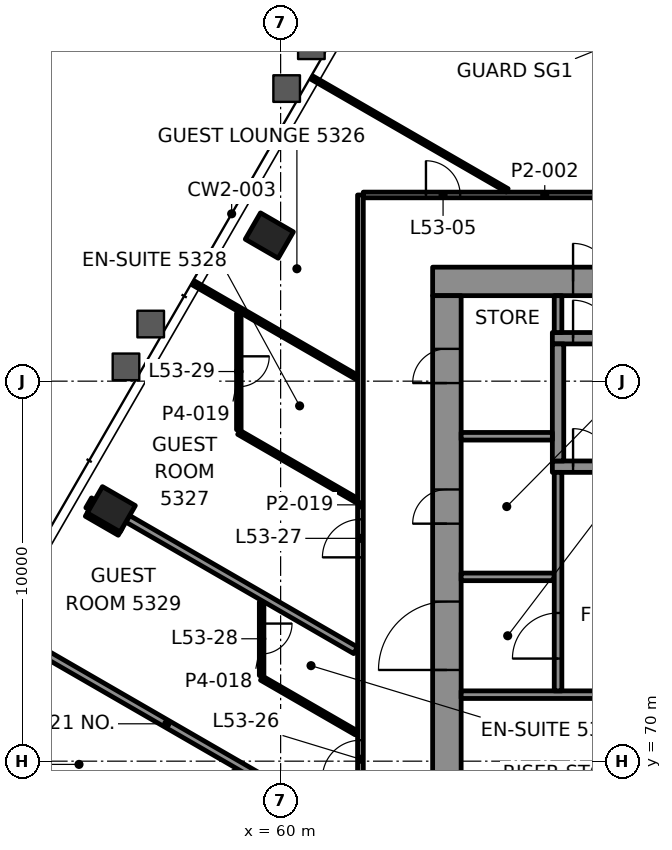
"""IFC4 building model, lengths in metres.
Left out: names, types, materials, properties, quantities, classifications, styles, units other than length and angle.
Written with IfcOpenShell. Run it as: python <this file> out.ifc"""

import sys

from ifc_helpers import new_model, si_unit, direction, frame, frame_2d, origin, origin_2d, place, context, subcontext, project, spatial, rectangle, hollow_rectangle, extrude, element, fill, save


model = new_model("IFC4")
c1 = context("Model", 3, precision=1e-05, world=origin(), true_north=direction((0.0, 1.0)))
c2 = subcontext(c1, "Body", "Model", "MODEL_VIEW")
j1 = project(units=[si_unit("LENGTHUNIT", "METRE"), si_unit("PLANEANGLEUNIT", "RADIAN")], contexts=[c1])
p1 = place(None, origin())
s1 = spatial("IfcSite", under=j1, at=p1, CompositionType="ELEMENT")
p2 = place(p1, origin())
s2 = spatial("IfcBuilding", under=s1, at=p2, CompositionType="ELEMENT")
p3 = place(p2, frame((0.0, 0.0, 226.0)))
s3 = spatial("IfcBuildingStorey", under=s2, at=p3, CompositionType="ELEMENT", Elevation=226.0)
for number, where, z_axis, x_axis in (
    (1, (59.703, 83.832, -0.0), (0.0, 0.0, 1.0), (-0.5, -0.866, 0.0)),
    (2, (55.544, 76.628, -0.0), (0.0, 0.0, 1.0), (-0.5, -0.866, 0.0)),
):
    element("IfcColumn", number, at=place(p3, frame(where, z_axis=z_axis, x_axis=x_axis)), inside=s3, PredefinedType="COLUMN", context=c2, shape_type="SweptSolid", body=[
        extrude(hollow_rectangle(XDim=0.8, YDim=1.0, WallThickness=0.05, at=origin_2d()), origin(), (0.0, 0.0, 1.0), 3.9),
    ])
p4 = place(p3, frame((64.0, 82.625, 0.0), z_axis=(0.0, 0.0, 1.0), x_axis=(1.0, 0.0, 0.0)))
e3 = element("IfcWall", 3, at=p4, inside=s3, PredefinedType="SHEAR", context=c2, shape_type="SweptSolid", body=[
    extrude(rectangle(XDim=22.0, YDim=0.75, at=frame_2d((11.0, 0.0))), origin(), (0.0, 0.0, 1.0), 3.7),
])
p5 = place(p4, frame((3.695, 0.0, 0.0)))
e4 = element("IfcOpeningElement", 4, at=p5, cuts=e3, PredefinedType="OPENING", context=c2, shape_type="SweptSolid", body=[
    extrude(rectangle(XDim=1.0, YDim=2.1, at=frame_2d((0.5, 1.05))), frame((0.0, 0.385, 0.0), z_axis=(0.0, -1.0, 0.0), x_axis=(1.0, 0.0, 0.0)), (0.0, 0.0, 1.0), 0.77),
])
p6 = place(p4, frame((17.505, 0.0, 0.0)))
e5 = element("IfcOpeningElement", 5, at=p6, cuts=e3, PredefinedType="OPENING", context=c2, shape_type="SweptSolid", body=[
    extrude(rectangle(XDim=1.0, YDim=2.1, at=frame_2d((0.5, 1.05))), frame((0.0, 0.385, 0.0), z_axis=(0.0, -1.0, 0.0), x_axis=(1.0, 0.0, 0.0)), (0.0, 0.0, 1.0), 0.77),
])
p7 = place(p4, frame((10.65, 0.0, 0.0)))
e6 = element("IfcOpeningElement", 6, at=p7, cuts=e3, PredefinedType="OPENING", context=c2, shape_type="SweptSolid", body=[
    extrude(rectangle(XDim=0.9, YDim=2.1, at=frame_2d((0.45, 1.05))), frame((0.0, 0.385, 0.0), z_axis=(0.0, -1.0, 0.0), x_axis=(1.0, 0.0, 0.0)), (0.0, 0.0, 1.0), 0.77),
])
p8 = place(p3, frame((64.375, 67.75, 0.0), z_axis=(0.0, 0.0, 1.0), x_axis=(0.0, 1.0, 0.0)))
e7 = element("IfcWall", 7, at=p8, inside=s3, PredefinedType="SHEAR", context=c2, shape_type="SweptSolid", body=[
    extrude(rectangle(XDim=14.5, YDim=0.75, at=frame_2d((7.25, 0.0))), origin(), (0.0, 0.0, 1.0), 3.7),
])
p9 = place(p8, frame((4.65, 0.0, 0.0)))
e8 = element("IfcOpeningElement", 8, at=p9, cuts=e7, PredefinedType="OPENING", context=c2, shape_type="SweptSolid", body=[
    extrude(rectangle(XDim=1.8, YDim=2.1, at=frame_2d((0.9, 1.05))), frame((0.0, 0.385, 0.0), z_axis=(0.0, -1.0, 0.0), x_axis=(1.0, 0.0, 0.0)), (0.0, 0.0, 1.0), 0.77),
])
p10 = place(p8, frame((8.5, 0.0, 0.0)))
e9 = element("IfcOpeningElement", 9, at=p10, cuts=e7, PredefinedType="OPENING", context=c2, shape_type="SweptSolid", body=[
    extrude(rectangle(XDim=0.9, YDim=2.1, at=frame_2d((0.45, 1.05))), frame((0.0, 0.385, 0.0), z_axis=(0.0, -1.0, 0.0), x_axis=(1.0, 0.0, 0.0)), (0.0, 0.0, 1.0), 0.77),
])
p11 = place(p8, frame((12.2, 0.0, 0.0)))
e10 = element("IfcOpeningElement", 10, at=p11, cuts=e7, PredefinedType="OPENING", context=c2, shape_type="SweptSolid", body=[
    extrude(rectangle(XDim=0.9, YDim=2.1, at=frame_2d((0.45, 1.05))), frame((0.0, 0.385, 0.0), z_axis=(0.0, -1.0, 0.0), x_axis=(1.0, 0.0, 0.0)), (0.0, 0.0, 1.0), 0.77),
])
p12 = place(p3, frame((67.15, 77.75, 0.0), z_axis=(0.0, 0.0, 1.0), x_axis=(1.0, 0.0, 0.0)))
e11 = element("IfcWall", 11, at=p12, inside=s3, PredefinedType="SHEAR", context=c2, shape_type="SweptSolid", body=[
    extrude(rectangle(XDim=17.45, YDim=0.3, at=frame_2d((8.725, 0.0))), origin(), (0.0, 0.0, 1.0), 3.7),
])
p13 = place(p12, frame((0.545, 0.0, 0.0)))
e12 = element("IfcOpeningElement", 12, at=p13, cuts=e11, PredefinedType="OPENING", context=c2, shape_type="SweptSolid", body=[
    extrude(rectangle(XDim=1.0, YDim=2.1, at=frame_2d((0.5, 1.05))), frame((0.0, 0.16, 0.0), z_axis=(0.0, -1.0, 0.0), x_axis=(1.0, 0.0, 0.0)), (0.0, 0.0, 1.0), 0.32),
])
p14 = place(p3, frame((67.15, 81.13, 0.0), z_axis=(0.0, 0.0, 1.0), x_axis=(1.0, 0.0, 0.0)))
e13 = element("IfcWall", 13, at=p14, inside=s3, PredefinedType="SHEAR", context=c2, shape_type="SweptSolid", body=[
    extrude(rectangle(XDim=6.91, YDim=0.3, at=frame_2d((3.455, 0.0))), origin(), (0.0, 0.0, 1.0), 3.7),
])
p15 = place(p14, frame((0.545, 0.0, 0.0)))
e14 = element("IfcOpeningElement", 14, at=p15, cuts=e13, PredefinedType="OPENING", context=c2, shape_type="SweptSolid", body=[
    extrude(rectangle(XDim=1.0, YDim=2.1, at=frame_2d((0.5, 1.05))), frame((0.0, 0.16, 0.0), z_axis=(0.0, -1.0, 0.0), x_axis=(1.0, 0.0, 0.0)), (0.0, 0.0, 1.0), 0.32),
])
p16 = place(p3, frame((67.3, 77.9, 0.0), z_axis=(0.0, 0.0, 1.0), x_axis=(0.0, 1.0, 0.0)))
e15 = element("IfcWall", 15, at=p16, inside=s3, PredefinedType="SHEAR", context=c2, shape_type="SweptSolid", body=[
    extrude(rectangle(XDim=3.08, YDim=0.3, at=frame_2d((1.54, 0.0))), origin(), (0.0, 0.0, 1.0), 3.7),
])
p17 = place(p3, frame((62.176, 84.9, 0.0), z_axis=(0.0, 0.0, 1.0), x_axis=(1.0, 0.0, 0.0)))
e16 = element("IfcWall", 16, at=p17, inside=s3, PredefinedType="PARTITIONING", context=c2, shape_type="SweptSolid", body=[
    extrude(rectangle(XDim=9.55, YDim=0.15, at=frame_2d((4.775, 0.0))), origin(), (0.0, 0.0, 1.0), 3.097),
])
p18 = place(p17, frame((1.649, 0.0, 0.0)))
e17 = element("IfcOpeningElement", 17, at=p18, cuts=e16, PredefinedType="OPENING", context=c2, shape_type="SweptSolid", body=[
    extrude(rectangle(XDim=0.9, YDim=2.1, at=frame_2d((0.45, 1.05))), frame((0.0, 0.085, 0.0), z_axis=(0.0, -1.0, 0.0), x_axis=(1.0, 0.0, 0.0)), (0.0, 0.0, 1.0), 0.17),
])
p19 = place(p17, frame((7.759, 0.0, 0.0)))
e18 = element("IfcOpeningElement", 18, at=p19, cuts=e16, PredefinedType="OPENING", context=c2, shape_type="SweptSolid", body=[
    extrude(rectangle(XDim=1.0, YDim=2.1, at=frame_2d((0.5, 1.05))), frame((0.0, 0.085, 0.0), z_axis=(0.0, -1.0, 0.0), x_axis=(1.0, 0.0, 0.0)), (0.0, 0.0, 1.0), 0.17),
])
p20 = place(p3, frame((58.889, 69.74, 0.0), z_axis=(0.0, 0.0, 1.0), x_axis=(-0.866039783157, -0.499975093369, 0.0)))
e19 = element("IfcWall", 19, at=p20, inside=s3, PredefinedType="PARTITIONING", context=c2, shape_type="SweptSolid", body=[
    extrude(rectangle(XDim=1.896, YDim=0.12, at=frame_2d((0.948, 0.0))), origin(), (0.0, 0.0, 1.0), 3.1),
])
p21 = place(p20, frame((0.548, 0.0, 0.0)))
e20 = element("IfcOpeningElement", 20, at=p21, cuts=e19, PredefinedType="OPENING", context=c2, shape_type="SweptSolid", body=[
    extrude(rectangle(XDim=0.8, YDim=2.1, at=frame_2d((0.4, 1.05))), frame((0.0, 0.07, 0.0), z_axis=(0.0, -1.0, 0.0), x_axis=(1.0, 0.0, 0.0)), (0.0, 0.0, 1.0), 0.14),
])
p22 = place(p3, frame((54.961, 76.619, 0.0), z_axis=(0.0, 0.0, 1.0), x_axis=(0.500426713919, 0.865778900179, 0.0)))
e21 = element("IfcWall", 21, at=p22, inside=s3, PredefinedType="PARTITIONING", context=c2, shape_type="SweptSolid", body=[
    extrude(rectangle(XDim=0.3, YDim=0.2, at=frame_2d((0.15, 0.0))), origin(), (0.0, 0.0, 1.0), 3.1),
])
p23 = place(p3, frame((62.1, 68.591, 0.0), z_axis=(0.0, 0.0, 1.0), x_axis=(0.0, 1.0, 0.0)))
e22 = element("IfcWall", 22, at=p23, inside=s3, PredefinedType="PARTITIONING", context=c2, shape_type="SweptSolid", body=[
    extrude(rectangle(XDim=16.308, YDim=0.15, at=frame_2d((8.154, 0.0))), origin(), (0.0, 0.0, 1.0), 3.1),
])
p24 = place(p23, frame((0.96, 0.0, 0.0)))
e23 = element("IfcOpeningElement", 23, at=p24, cuts=e22, PredefinedType="OPENING", context=c2, shape_type="SweptSolid", body=[
    extrude(rectangle(XDim=1.0, YDim=2.1, at=frame_2d((0.5, 1.05))), frame((0.0, 0.085, 0.0), z_axis=(0.0, -1.0, 0.0), x_axis=(1.0, 0.0, 0.0)), (0.0, 0.0, 1.0), 0.17),
])
p25 = place(p23, frame((6.772, 0.0, 0.0)))
e24 = element("IfcOpeningElement", 24, at=p25, cuts=e22, PredefinedType="OPENING", context=c2, shape_type="SweptSolid", body=[
    extrude(rectangle(XDim=1.0, YDim=2.1, at=frame_2d((0.5, 1.05))), frame((0.0, 0.085, 0.0), z_axis=(0.0, -1.0, 0.0), x_axis=(1.0, 0.0, 0.0)), (0.0, 0.0, 1.0), 0.17),
])
p26 = place(p3, frame((59.5, 74.189, 0.0), z_axis=(0.0, 0.0, 1.0), x_axis=(0.0, -1.0, 0.0)))
e25 = element("IfcWall", 25, at=p26, inside=s3, PredefinedType="PARTITIONING", context=c2, shape_type="SweptSolid", body=[
    extrude(rectangle(XDim=1.936, YDim=0.12, at=frame_2d((0.968, 0.0))), origin(), (0.0, 0.0, 1.0), 3.1),
])
p27 = place(p26, frame((0.568, 0.0, 0.0)))
e26 = element("IfcOpeningElement", 26, at=p27, cuts=e25, PredefinedType="OPENING", context=c2, shape_type="SweptSolid", body=[
    extrude(rectangle(XDim=0.8, YDim=2.1, at=frame_2d((0.4, 1.05))), frame((0.0, 0.07, 0.0), z_axis=(0.0, -1.0, 0.0), x_axis=(1.0, 0.0, 0.0)), (0.0, 0.0, 1.0), 0.14),
])
p28 = place(p3, frame((58.9, 81.785, 0.0), z_axis=(0.0, 0.0, 1.0), x_axis=(0.0, -1.0, 0.0)))
e27 = element("IfcWall", 27, at=p28, inside=s3, PredefinedType="PARTITIONING", context=c2, shape_type="SweptSolid", body=[
    extrude(rectangle(XDim=3.063, YDim=0.12, at=frame_2d((1.531, 0.0))), origin(), (0.0, 0.0, 1.0), 3.1),
])
p29 = place(p28, frame((1.131, 0.0, 0.0)))
e28 = element("IfcOpeningElement", 28, at=p29, cuts=e27, PredefinedType="OPENING", context=c2, shape_type="SweptSolid", body=[
    extrude(rectangle(XDim=0.8, YDim=2.1, at=frame_2d((0.4, 1.05))), frame((0.0, 0.07, 0.0), z_axis=(0.0, -1.0, 0.0), x_axis=(1.0, 0.0, 0.0)), (0.0, 0.0, 1.0), 0.14),
])
p30 = place(p3, frame((69.79, 88.092, 0.0), z_axis=(0.0, 0.0, 1.0), x_axis=(-0.866045006744, 0.49996604514, 0.0)))
e29 = element("IfcWall", 29, at=p30, inside=s3, PredefinedType="PARTITIONING", context=c2, shape_type="SweptSolid", body=[
    extrude(rectangle(XDim=3.499, YDim=0.12, at=frame_2d((1.75, 0.0))), origin(), (0.0, 0.0, 1.0), 3.1),
])
p31 = place(p3, frame((65.963, 85.02, 0.0), z_axis=(0.0, 0.0, 1.0), x_axis=(-0.866029186229, 0.499993448556, 0.0)))
e30 = element("IfcWall", 30, at=p31, inside=s3, PredefinedType="PARTITIONING", context=c2, shape_type="SweptSolid", body=[
    extrude(rectangle(XDim=5.927, YDim=0.1, at=frame_2d((2.963, 0.0))), origin(), (0.0, 0.0, 1.0), 3.022),
])
p32 = place(p3, frame((61.991, 80.11, 0.0), z_axis=(0.0, 0.0, 1.0), x_axis=(-0.866024338871, 0.500001844479, 0.0)))
e31 = element("IfcWall", 31, at=p32, inside=s3, PredefinedType="PARTITIONING", context=c2, shape_type="SweptSolid", body=[
    extrude(rectangle(XDim=4.942, YDim=0.12, at=frame_2d((2.471, 0.0))), origin(), (0.0, 0.0, 1.0), 3.022),
])
p33 = place(p3, frame((61.99, 76.868, 0.0), z_axis=(0.0, 0.0, 1.0), x_axis=(-0.866028357664, 0.499994883695, 0.0)))
e32 = element("IfcWall", 32, at=p33, inside=s3, PredefinedType="PARTITIONING", context=c2, shape_type="SweptSolid", body=[
    extrude(rectangle(XDim=3.568, YDim=0.12, at=frame_2d((1.784, 0.0))), origin(), (0.0, 0.0, 1.0), 3.1),
])
p34 = place(p3, frame((61.973, 72.917, 0.0), z_axis=(0.0, 0.0, 1.0), x_axis=(-0.866027621823, 0.499996158224, 0.0)))
e33 = element("IfcWall", 33, at=p34, inside=s3, PredefinedType="PARTITIONING", context=c2, shape_type="SweptSolid", body=[
    extrude(rectangle(XDim=6.923, YDim=0.2, at=frame_2d((3.462, 0.0))), origin(), (0.0, 0.0, 1.0), 3.1),
])
p35 = place(p3, frame((55.777, 76.032, 0.0), z_axis=(0.0, 0.0, 1.0), x_axis=(-0.866010750942, 0.50002537861, 0.0)))
e34 = element("IfcWall", 34, at=p35, inside=s3, PredefinedType="PARTITIONING", context=c2, shape_type="SweptSolid", body=[
    extrude(rectangle(XDim=1.0, YDim=0.2, at=frame_2d((0.5, 0.0))), origin(), (0.0, 0.0, 1.0), 3.022),
])
p36 = place(p3, frame((61.99, 70.746, 0.0), z_axis=(0.0, 0.0, 1.0), x_axis=(-0.86600886466, 0.50002864551, 0.0)))
e35 = element("IfcWall", 35, at=p36, inside=s3, PredefinedType="PARTITIONING", context=c2, shape_type="SweptSolid", body=[
    extrude(rectangle(XDim=2.876, YDim=0.12, at=frame_2d((1.438, 0.0))), origin(), (0.0, 0.0, 1.0), 3.1),
])
p37 = place(p3, frame((61.497, 68.39, 0.0), z_axis=(0.0, 0.0, 1.0), x_axis=(-0.866030396021, 0.499991353094, 0.0)))
e36 = element("IfcWall", 36, at=p37, inside=s3, PredefinedType="PARTITIONING", context=c2, shape_type="SweptSolid", body=[
    extrude(rectangle(XDim=10.374, YDim=0.2, at=frame_2d((5.187, 0.0))), origin(), (0.0, 0.0, 1.0), 3.022),
])
p38 = place(p3, frame((64.75, 71.75, 0.0), z_axis=(0.0, 0.0, 1.0), x_axis=(1.0, 0.0, 0.0)))
e37 = element("IfcWall", 37, at=p38, inside=s3, PredefinedType="PARTITIONING", context=c2, shape_type="SweptSolid", body=[
    extrude(rectangle(XDim=5.55, YDim=0.2, at=frame_2d((2.775, 0.0))), origin(), (0.0, 0.0, 1.0), 3.7),
])
p39 = place(p3, frame((64.75, 74.85, 0.0), z_axis=(0.0, 0.0, 1.0), x_axis=(1.0, 0.0, 0.0)))
e38 = element("IfcWall", 38, at=p39, inside=s3, PredefinedType="PARTITIONING", context=c2, shape_type="SweptSolid", body=[
    extrude(rectangle(XDim=2.45, YDim=0.2, at=frame_2d((1.225, 0.0))), origin(), (0.0, 0.0, 1.0), 3.7),
])
p40 = place(p3, frame((64.75, 78.55, 0.0), z_axis=(0.0, 0.0, 1.0), x_axis=(1.0, 0.0, 0.0)))
e39 = element("IfcWall", 39, at=p40, inside=s3, PredefinedType="PARTITIONING", context=c2, shape_type="SweptSolid", body=[
    extrude(rectangle(XDim=2.4, YDim=0.2, at=frame_2d((1.2, 0.0))), origin(), (0.0, 0.0, 1.0), 3.7),
])
p41 = place(p3, frame((67.3, 71.85, 0.0), z_axis=(0.0, 0.0, 1.0), x_axis=(0.0, 1.0, 0.0)))
e40 = element("IfcWall", 40, at=p41, inside=s3, PredefinedType="PARTITIONING", context=c2, shape_type="SweptSolid", body=[
    extrude(rectangle(XDim=5.75, YDim=0.2, at=frame_2d((2.875, 0.0))), origin(), (0.0, 0.0, 1.0), 3.7),
])
p42 = place(p41, frame((0.85, 0.0, 0.0)))
e41 = element("IfcOpeningElement", 41, at=p42, cuts=e40, PredefinedType="OPENING", context=c2, shape_type="SweptSolid", body=[
    extrude(rectangle(XDim=1.2, YDim=2.1, at=frame_2d((0.6, 1.05))), frame((0.0, 0.11, 0.0), z_axis=(0.0, -1.0, 0.0), x_axis=(1.0, 0.0, 0.0)), (0.0, 0.0, 1.0), 0.22),
])
p43 = place(p3, frame((67.3, 81.28, 0.0), z_axis=(0.0, 0.0, 1.0), x_axis=(0.0, 1.0, 0.0)))
e42 = element("IfcWall", 42, at=p43, inside=s3, PredefinedType="PARTITIONING", context=c2, shape_type="SweptSolid", body=[
    extrude(rectangle(XDim=0.97, YDim=0.2, at=frame_2d((0.485, 0.0))), origin(), (0.0, 0.0, 1.0), 3.7),
])
p44 = place(p18, origin())
e43 = element("IfcDoor", 43, at=p44, inside=s3, OperationType="SINGLE_SWING_LEFT", PredefinedType="DOOR", context=c2, shape_type="SweptSolid", body=[
    extrude(rectangle(XDim=0.9, YDim=2.1, at=frame_2d((0.45, 1.05))), frame((0.0, 0.025, 0.0), z_axis=(0.0, -1.0, 0.0), x_axis=(1.0, 0.0, 0.0)), (0.0, 0.0, 1.0), 0.05),
])
fill(e17, e43)
p45 = place(p24, origin())
e44 = element("IfcDoor", 44, at=p45, inside=s3, OperationType="SINGLE_SWING_RIGHT", PredefinedType="DOOR", context=c2, shape_type="SweptSolid", body=[
    extrude(rectangle(XDim=1.0, YDim=2.1, at=frame_2d((0.5, 1.05))), frame((0.0, 0.025, 0.0), z_axis=(0.0, -1.0, 0.0), x_axis=(1.0, 0.0, 0.0)), (0.0, 0.0, 1.0), 0.05),
])
fill(e23, e44)
p46 = place(p25, origin())
e45 = element("IfcDoor", 45, at=p46, inside=s3, OperationType="SINGLE_SWING_RIGHT", PredefinedType="DOOR", context=c2, shape_type="SweptSolid", body=[
    extrude(rectangle(XDim=1.0, YDim=2.1, at=frame_2d((0.5, 1.05))), frame((0.0, 0.025, 0.0), z_axis=(0.0, -1.0, 0.0), x_axis=(1.0, 0.0, 0.0)), (0.0, 0.0, 1.0), 0.05),
])
fill(e24, e45)
p47 = place(p27, origin())
e46 = element("IfcDoor", 46, at=p47, inside=s3, OperationType="SINGLE_SWING_RIGHT", PredefinedType="DOOR", context=c2, shape_type="SweptSolid", body=[
    extrude(rectangle(XDim=0.8, YDim=2.1, at=frame_2d((0.4, 1.05))), frame((0.0, 0.025, 0.0), z_axis=(0.0, -1.0, 0.0), x_axis=(1.0, 0.0, 0.0)), (0.0, 0.0, 1.0), 0.05),
])
fill(e26, e46)
p48 = place(p29, origin())
e47 = element("IfcDoor", 47, at=p48, inside=s3, OperationType="SINGLE_SWING_RIGHT", PredefinedType="DOOR", context=c2, shape_type="SweptSolid", body=[
    extrude(rectangle(XDim=0.8, YDim=2.1, at=frame_2d((0.4, 1.05))), frame((0.0, 0.025, 0.0), z_axis=(0.0, -1.0, 0.0), x_axis=(1.0, 0.0, 0.0)), (0.0, 0.0, 1.0), 0.05),
])
fill(e28, e47)
p49 = place(p13, origin())
e48 = element("IfcDoor", 48, at=p49, inside=s3, OperationType="SINGLE_SWING_LEFT", PredefinedType="DOOR", context=c2, shape_type="SweptSolid", body=[
    extrude(rectangle(XDim=1.0, YDim=2.1, at=frame_2d((0.5, 1.05))), frame((0.0, 0.025, 0.0), z_axis=(0.0, -1.0, 0.0), x_axis=(1.0, 0.0, 0.0)), (0.0, 0.0, 1.0), 0.05),
])
fill(e12, e48)
p50 = place(p15, origin())
e49 = element("IfcDoor", 49, at=p50, inside=s3, OperationType="SINGLE_SWING_RIGHT", PredefinedType="DOOR", context=c2, shape_type="SweptSolid", body=[
    extrude(rectangle(XDim=1.0, YDim=2.1, at=frame_2d((0.5, 1.05))), frame((0.0, 0.025, 0.0), z_axis=(0.0, -1.0, 0.0), x_axis=(1.0, 0.0, 0.0)), (0.0, 0.0, 1.0), 0.05),
])
fill(e14, e49)
p51 = place(p5, origin())
e50 = element("IfcDoor", 50, at=p51, inside=s3, OperationType="SINGLE_SWING_LEFT", PredefinedType="DOOR", context=c2, shape_type="SweptSolid", body=[
    extrude(rectangle(XDim=1.0, YDim=2.1, at=frame_2d((0.5, 1.05))), frame((0.0, 0.095, 0.0), z_axis=(0.0, -1.0, 0.0), x_axis=(1.0, 0.0, 0.0)), (0.0, 0.0, 1.0), 0.19),
])
fill(e4, e50)
p52 = place(p42, origin())
e51 = element("IfcDoor", 51, at=p52, inside=s3, OperationType="SINGLE_SWING_RIGHT", PredefinedType="DOOR", context=c2, shape_type="SweptSolid", body=[
    extrude(rectangle(XDim=1.2, YDim=2.1, at=frame_2d((0.6, 1.05))), frame((0.0, 0.025, 0.0), z_axis=(0.0, -1.0, 0.0), x_axis=(1.0, 0.0, 0.0)), (0.0, 0.0, 1.0), 0.05),
])
fill(e41, e51)
p53 = place(p9, origin())
e52 = element("IfcDoor", 52, at=p53, inside=s3, OperationType="SINGLE_SWING_LEFT", PredefinedType="DOOR", context=c2, shape_type="SweptSolid", body=[
    extrude(rectangle(XDim=1.8, YDim=2.1, at=frame_2d((0.9, 1.05))), frame((0.0, 0.095, 0.0), z_axis=(0.0, -1.0, 0.0), x_axis=(1.0, 0.0, 0.0)), (0.0, 0.0, 1.0), 0.19),
])
fill(e8, e52)
p54 = place(p10, origin())
e53 = element("IfcDoor", 53, at=p54, inside=s3, OperationType="SINGLE_SWING_RIGHT", PredefinedType="DOOR", context=c2, shape_type="SweptSolid", body=[
    extrude(rectangle(XDim=0.9, YDim=2.1, at=frame_2d((0.45, 1.05))), frame((0.0, 0.095, 0.0), z_axis=(0.0, -1.0, 0.0), x_axis=(1.0, 0.0, 0.0)), (0.0, 0.0, 1.0), 0.19),
])
fill(e9, e53)
p55 = place(p11, origin())
e54 = element("IfcDoor", 54, at=p55, inside=s3, OperationType="SINGLE_SWING_LEFT", PredefinedType="DOOR", context=c2, shape_type="SweptSolid", body=[
    extrude(rectangle(XDim=0.9, YDim=2.1, at=frame_2d((0.45, 1.05))), frame((0.0, 0.095, 0.0), z_axis=(0.0, -1.0, 0.0), x_axis=(1.0, 0.0, 0.0)), (0.0, 0.0, 1.0), 0.19),
])
fill(e10, e54)
save(model, sys.argv[1])
